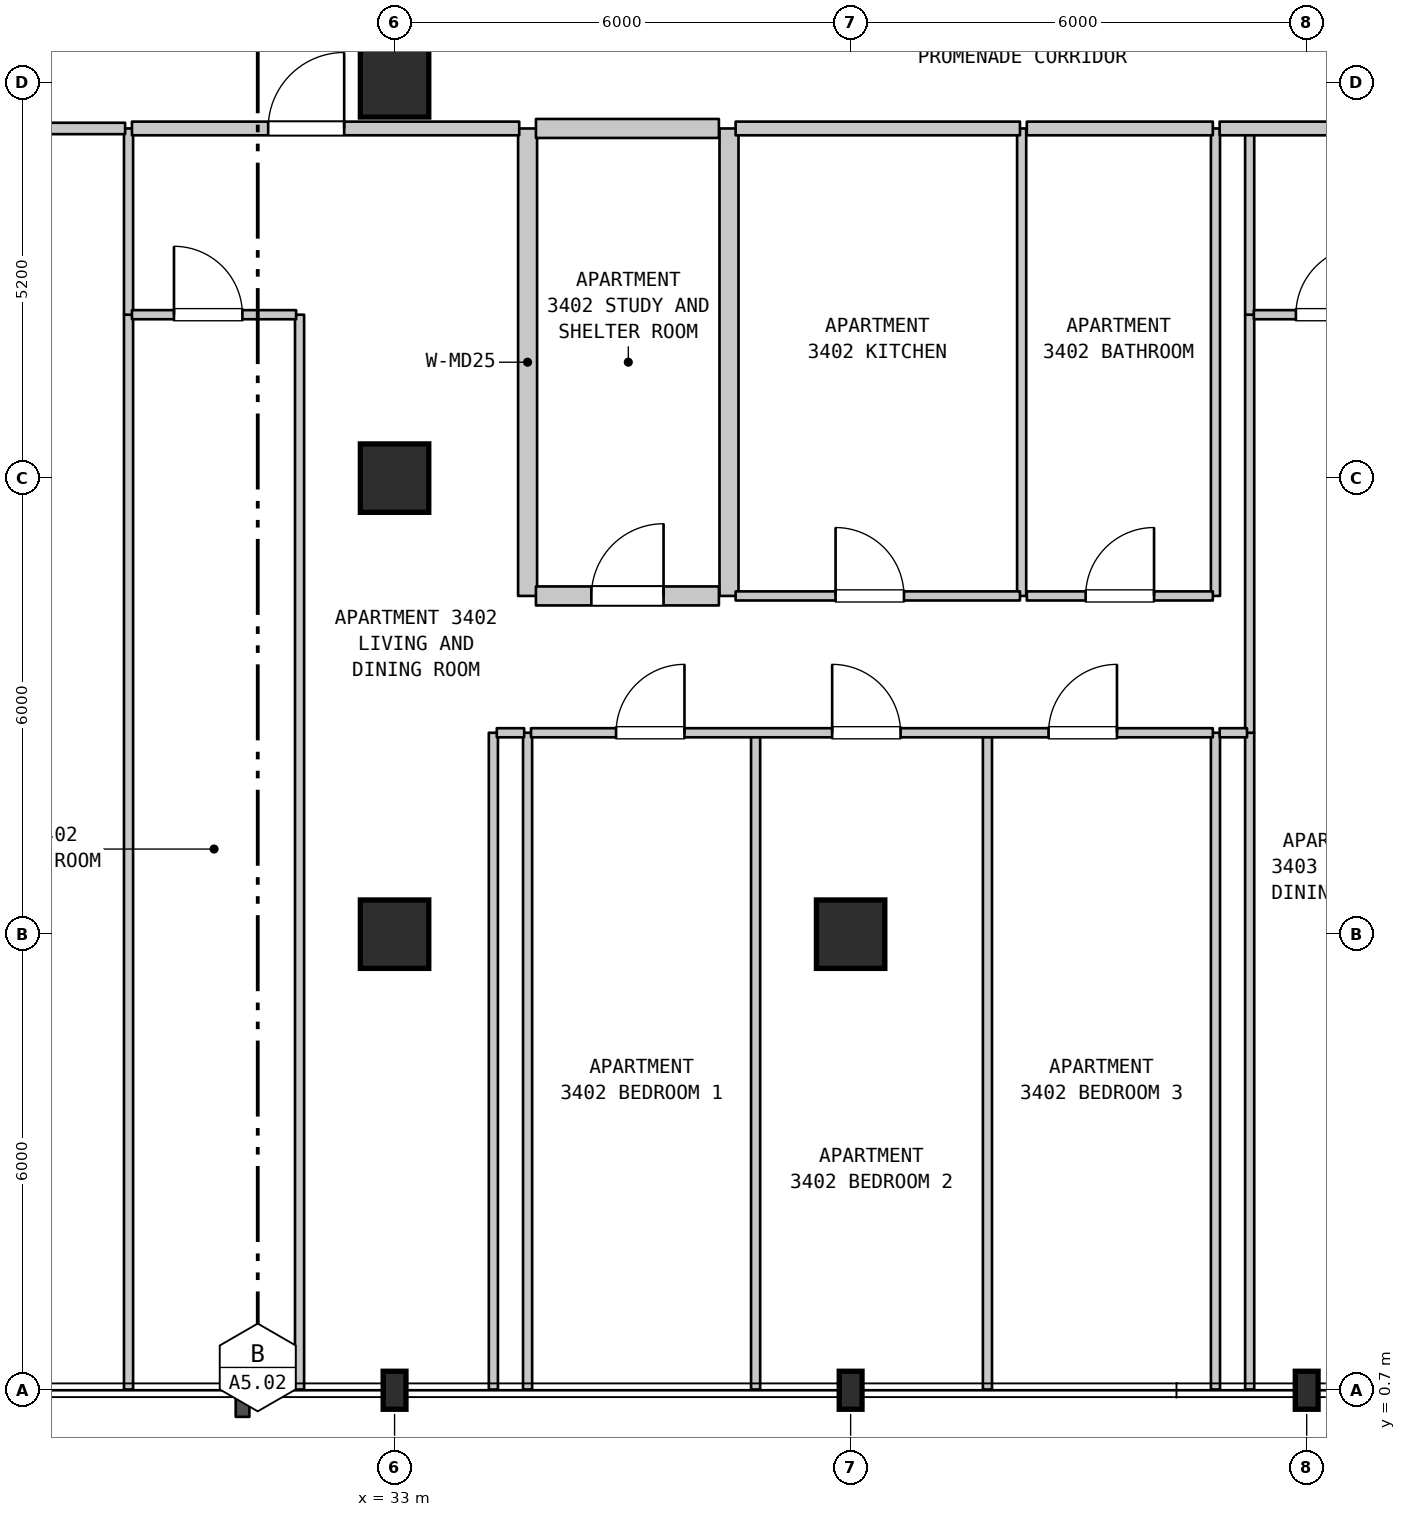
"""IFC4 building model, lengths in metres.
Left out: names, types, materials, properties, quantities, classifications, styles, units other than length and angle.
Written with IfcOpenShell. Run it as: python <this file> out.ifc"""

import sys

from ifc_helpers import new_model, si_unit, direction, frame, frame_2d, origin, origin_2d, place, context, subcontext, project, spatial, rectangle, i_section, extrude, element, fill, save


model = new_model("IFC4")
c1 = context("Model", 3, precision=1e-05, world=origin(), true_north=direction((0.0, 1.0)))
c2 = subcontext(c1, "Body", "Model", "MODEL_VIEW")
j1 = project(units=[si_unit("LENGTHUNIT", "METRE"), si_unit("PLANEANGLEUNIT", "RADIAN")], contexts=[c1])
p1 = place(None, origin())
s1 = spatial("IfcSite", under=j1, at=p1, CompositionType="ELEMENT")
p2 = place(p1, origin())
s2 = spatial("IfcBuilding", under=s1, at=p2, CompositionType="ELEMENT")
p3 = place(p2, frame((0.0, 0.0, 140.9)))
s3 = spatial("IfcBuildingStorey", under=s2, at=p3, CompositionType="ELEMENT", Elevation=140.9)
p4 = place(p3, frame((33.0, 0.7, 0.0), z_axis=(0.0, 0.0, 1.0), x_axis=(1.0, 0.0, 0.0)))
e1 = element("IfcColumn", 1, at=p4, inside=s3, PredefinedType="COLUMN", context=c2, shape_type="SweptSolid", body=[
    extrude(i_section(OverallWidth=0.3, OverallDepth=0.5, WebThickness=0.014, FlangeThickness=0.028, FilletRadius=0.027, at=origin_2d()), origin(), (0.0, 0.0, 1.0), 3.7),
])
for number, where, z_axis, x_axis in (
    (2, (33.0, 6.7, 0.0), (0.0, 0.0, 1.0), (1.0, 0.0, 0.0)),
    (3, (33.0, 12.7, 0.0), (0.0, 0.0, 1.0), (1.0, 0.0, 0.0)),
    (4, (33.0, 17.9, 0.0), (0.0, 0.0, 1.0), (1.0, 0.0, 0.0)),
):
    element("IfcColumn", number, at=place(p3, frame(where, z_axis=z_axis, x_axis=x_axis)), inside=s3, PredefinedType="COLUMN", context=c2, shape_type="SweptSolid", body=[
        extrude(rectangle(XDim=0.9, YDim=0.9, at=origin_2d()), origin(), (0.0, 0.0, 1.0), 3.7),
    ])
p5 = place(p3, frame((39.0, 0.7, 0.0), z_axis=(0.0, 0.0, 1.0), x_axis=(1.0, 0.0, 0.0)))
e5 = element("IfcColumn", 5, at=p5, inside=s3, PredefinedType="COLUMN", context=c2, shape_type="SweptSolid", body=[
    extrude(i_section(OverallWidth=0.3, OverallDepth=0.5, WebThickness=0.014, FlangeThickness=0.028, FilletRadius=0.027, at=origin_2d()), origin(), (0.0, 0.0, 1.0), 3.7),
])
p6 = place(p3, frame((39.0, 6.7, 0.0), z_axis=(0.0, 0.0, 1.0), x_axis=(1.0, 0.0, 0.0)))
e6 = element("IfcColumn", 6, at=p6, inside=s3, PredefinedType="COLUMN", context=c2, shape_type="SweptSolid", body=[
    extrude(rectangle(XDim=0.9, YDim=0.9, at=origin_2d()), origin(), (0.0, 0.0, 1.0), 3.7),
])
p7 = place(p3, frame((45.0, 0.7, 0.0), z_axis=(0.0, 0.0, 1.0), x_axis=(1.0, 0.0, 0.0)))
e7 = element("IfcColumn", 7, at=p7, inside=s3, PredefinedType="COLUMN", context=c2, shape_type="SweptSolid", body=[
    extrude(i_section(OverallWidth=0.3, OverallDepth=0.5, WebThickness=0.014, FlangeThickness=0.028, FilletRadius=0.027, at=origin_2d()), origin(), (0.0, 0.0, 1.0), 3.7),
])
p8 = place(p3, frame((29.5, 0.71, 0.0), z_axis=(0.0, 0.0, 1.0), x_axis=(0.0, 1.0, 0.0)))
e8 = element("IfcWall", 8, at=p8, inside=s3, PredefinedType="PARTITIONING", context=c2, shape_type="SweptSolid", body=[
    extrude(rectangle(XDim=14.14, YDim=0.12, at=frame_2d((7.07, 0.0))), origin(), (0.0, 0.0, 1.0), 3.385),
])
p9 = place(p3, frame((29.5, 14.85, 0.0), z_axis=(0.0, 0.0, 1.0), x_axis=(0.0, 1.0, 0.0)))
e9 = element("IfcWall", 9, at=p9, inside=s3, PredefinedType="PARTITIONING", context=c2, shape_type="SweptSolid", body=[
    extrude(rectangle(XDim=2.45, YDim=0.12, at=frame_2d((1.225, 0.0))), origin(), (0.0, 0.0, 1.0), 3.385),
])
p10 = place(p3, frame((31.75, 0.71, 0.0), z_axis=(0.0, 0.0, 1.0), x_axis=(0.0, 1.0, 0.0)))
e10 = element("IfcWall", 10, at=p10, inside=s3, PredefinedType="PARTITIONING", context=c2, shape_type="SweptSolid", body=[
    extrude(rectangle(XDim=14.14, YDim=0.12, at=frame_2d((7.07, 0.0))), origin(), (0.0, 0.0, 1.0), 3.385),
])
for number, where, z_axis, x_axis in (
    (11, (34.3, 0.71, 0.0), (0.0, 0.0, 1.0), (0.0, 1.0, 0.0)),
    (12, (34.75, 0.71, 0.0), (0.0, 0.0, 1.0), (0.0, 1.0, 0.0)),
):
    element("IfcWall", number, at=place(p3, frame(where, z_axis=z_axis, x_axis=x_axis)), inside=s3, PredefinedType="PARTITIONING", context=c2, shape_type="SweptSolid", body=[
        extrude(rectangle(XDim=8.64, YDim=0.12, at=frame_2d((4.32, 0.0))), origin(), (0.0, 0.0, 1.0), 3.385),
    ])
for number, where, z_axis, x_axis in (
    (13, (34.75, 11.15, 0.0), (0.0, 0.0, 1.0), (0.0, 1.0, 0.0)),
    (14, (37.4, 11.15, 0.0), (0.0, 0.0, 1.0), (0.0, 1.0, 0.0)),
):
    element("IfcWall", number, at=place(p3, frame(where, z_axis=z_axis, x_axis=x_axis)), inside=s3, PredefinedType="STANDARD", context=c2, shape_type="SweptSolid", body=[
        extrude(rectangle(XDim=6.15, YDim=0.25, at=frame_2d((3.075, 0.0))), origin(), (0.0, 0.0, 1.0), 3.385),
    ])
for number, where, z_axis, x_axis in (
    (15, (37.75, 0.71, 0.0), (0.0, 0.0, 1.0), (0.0, 1.0, 0.0)),
    (16, (40.8, 0.71, 0.0), (0.0, 0.0, 1.0), (0.0, 1.0, 0.0)),
):
    element("IfcWall", number, at=place(p3, frame(where, z_axis=z_axis, x_axis=x_axis)), inside=s3, PredefinedType="PARTITIONING", context=c2, shape_type="SweptSolid", body=[
        extrude(rectangle(XDim=8.64, YDim=0.12, at=frame_2d((4.32, 0.0))), origin(), (0.0, 0.0, 1.0), 3.385),
    ])
p11 = place(p3, frame((41.25, 11.15, 0.0), z_axis=(0.0, 0.0, 1.0), x_axis=(0.0, 1.0, 0.0)))
e17 = element("IfcWall", 17, at=p11, inside=s3, PredefinedType="PARTITIONING", context=c2, shape_type="SweptSolid", body=[
    extrude(rectangle(XDim=6.15, YDim=0.12, at=frame_2d((3.075, 0.0))), origin(), (0.0, 0.0, 1.0), 3.385),
])
p12 = place(p3, frame((43.8, 0.71, 0.0), z_axis=(0.0, 0.0, 1.0), x_axis=(0.0, 1.0, 0.0)))
e18 = element("IfcWall", 18, at=p12, inside=s3, PredefinedType="PARTITIONING", context=c2, shape_type="SweptSolid", body=[
    extrude(rectangle(XDim=8.64, YDim=0.12, at=frame_2d((4.32, 0.0))), origin(), (0.0, 0.0, 1.0), 3.385),
])
p13 = place(p3, frame((43.8, 11.15, 0.0), z_axis=(0.0, 0.0, 1.0), x_axis=(0.0, 1.0, 0.0)))
e19 = element("IfcWall", 19, at=p13, inside=s3, PredefinedType="PARTITIONING", context=c2, shape_type="SweptSolid", body=[
    extrude(rectangle(XDim=6.15, YDim=0.12, at=frame_2d((3.075, 0.0))), origin(), (0.0, 0.0, 1.0), 3.385),
])
p14 = place(p3, frame((44.25, 0.71, 0.0), z_axis=(0.0, 0.0, 1.0), x_axis=(0.0, 1.0, 0.0)))
e20 = element("IfcWall", 20, at=p14, inside=s3, PredefinedType="PARTITIONING", context=c2, shape_type="SweptSolid", body=[
    extrude(rectangle(XDim=8.64, YDim=0.12, at=frame_2d((4.32, 0.0))), origin(), (0.0, 0.0, 1.0), 3.385),
])
p15 = place(p3, frame((44.25, 9.35, 0.0), z_axis=(0.0, 0.0, 1.0), x_axis=(0.0, 1.0, 0.0)))
e21 = element("IfcWall", 21, at=p15, inside=s3, PredefinedType="PARTITIONING", context=c2, shape_type="SweptSolid", body=[
    extrude(rectangle(XDim=5.5, YDim=0.12, at=frame_2d((2.75, 0.0))), origin(), (0.0, 0.0, 1.0), 3.385),
])
p16 = place(p3, frame((44.25, 14.85, 0.0), z_axis=(0.0, 0.0, 1.0), x_axis=(0.0, 1.0, 0.0)))
e22 = element("IfcWall", 22, at=p16, inside=s3, PredefinedType="PARTITIONING", context=c2, shape_type="SweptSolid", body=[
    extrude(rectangle(XDim=2.45, YDim=0.12, at=frame_2d((1.225, 0.0))), origin(), (0.0, 0.0, 1.0), 3.385),
])
p17 = place(p3, frame((34.345, 9.35, 0.0), z_axis=(0.0, 0.0, 1.0), x_axis=(1.0, 0.0, 0.0)))
e23 = element("IfcWall", 23, at=p17, inside=s3, PredefinedType="PARTITIONING", context=c2, shape_type="SweptSolid", body=[
    extrude(rectangle(XDim=0.36, YDim=0.12, at=frame_2d((0.18, 0.0))), origin(), (0.0, 0.0, 1.0), 3.385),
])
p18 = place(p3, frame((34.795, 9.35, 0.0), z_axis=(0.0, 0.0, 1.0), x_axis=(1.0, 0.0, 0.0)))
e24 = element("IfcWall", 24, at=p18, inside=s3, PredefinedType="PARTITIONING", context=c2, shape_type="SweptSolid", body=[
    extrude(rectangle(XDim=8.97, YDim=0.12, at=frame_2d((4.485, 0.0))), origin(), (0.0, 0.0, 1.0), 3.385),
])
p19 = place(p18, frame((1.119, 0.0, 0.0)))
e25 = element("IfcOpeningElement", 25, at=p19, cuts=e24, PredefinedType="OPENING", context=c2, shape_type="SweptSolid", body=[
    extrude(rectangle(XDim=0.9, YDim=2.15, at=frame_2d((0.45, 1.075))), frame((0.0, 0.07, 0.0), z_axis=(0.0, -1.0, 0.0), x_axis=(1.0, 0.0, 0.0)), (0.0, 0.0, 1.0), 0.14),
])
p20 = place(p18, frame((3.962, 0.0, 0.0)))
e26 = element("IfcOpeningElement", 26, at=p20, cuts=e24, PredefinedType="OPENING", context=c2, shape_type="SweptSolid", body=[
    extrude(rectangle(XDim=0.9, YDim=2.15, at=frame_2d((0.45, 1.075))), frame((0.0, 0.07, 0.0), z_axis=(0.0, -1.0, 0.0), x_axis=(1.0, 0.0, 0.0)), (0.0, 0.0, 1.0), 0.14),
])
p21 = place(p18, frame((6.809, 0.0, 0.0)))
e27 = element("IfcOpeningElement", 27, at=p21, cuts=e24, PredefinedType="OPENING", context=c2, shape_type="SweptSolid", body=[
    extrude(rectangle(XDim=0.9, YDim=2.15, at=frame_2d((0.45, 1.075))), frame((0.0, 0.07, 0.0), z_axis=(0.0, -1.0, 0.0), x_axis=(1.0, 0.0, 0.0)), (0.0, 0.0, 1.0), 0.14),
])
p22 = place(p3, frame((43.855, 9.35, 0.0), z_axis=(0.0, 0.0, 1.0), x_axis=(1.0, 0.0, 0.0)))
e28 = element("IfcWall", 28, at=p22, inside=s3, PredefinedType="PARTITIONING", context=c2, shape_type="SweptSolid", body=[
    extrude(rectangle(XDim=0.36, YDim=0.12, at=frame_2d((0.18, 0.0))), origin(), (0.0, 0.0, 1.0), 3.385),
])
p23 = place(p3, frame((34.86, 11.15, 0.0), z_axis=(0.0, 0.0, 1.0), x_axis=(1.0, 0.0, 0.0)))
e29 = element("IfcWall", 29, at=p23, inside=s3, PredefinedType="STANDARD", context=c2, shape_type="SweptSolid", body=[
    extrude(rectangle(XDim=2.407, YDim=0.25, at=frame_2d((1.204, 0.0))), origin(), (0.0, 0.0, 1.0), 3.385),
])
p24 = place(p23, frame((0.729, 0.0, 0.0)))
e30 = element("IfcOpeningElement", 30, at=p24, cuts=e29, PredefinedType="OPENING", context=c2, shape_type="SweptSolid", body=[
    extrude(rectangle(XDim=0.95, YDim=2.15, at=frame_2d((0.475, 1.075))), frame((0.0, 0.135, 0.0), z_axis=(0.0, -1.0, 0.0), x_axis=(1.0, 0.0, 0.0)), (0.0, 0.0, 1.0), 0.27),
])
p25 = place(p3, frame((37.487, 11.15, 0.0), z_axis=(0.0, 0.0, 1.0), x_axis=(1.0, 0.0, 0.0)))
e31 = element("IfcWall", 31, at=p25, inside=s3, PredefinedType="PARTITIONING", context=c2, shape_type="SweptSolid", body=[
    extrude(rectangle(XDim=3.741, YDim=0.12, at=frame_2d((1.871, 0.0))), origin(), (0.0, 0.0, 1.0), 3.385),
])
p26 = place(p25, frame((1.315, 0.0, 0.0)))
e32 = element("IfcOpeningElement", 32, at=p26, cuts=e31, PredefinedType="OPENING", context=c2, shape_type="SweptSolid", body=[
    extrude(rectangle(XDim=0.9, YDim=2.15, at=frame_2d((0.45, 1.075))), frame((0.0, 0.07, 0.0), z_axis=(0.0, -1.0, 0.0), x_axis=(1.0, 0.0, 0.0)), (0.0, 0.0, 1.0), 0.14),
])
p27 = place(p3, frame((41.318, 11.15, 0.0), z_axis=(0.0, 0.0, 1.0), x_axis=(1.0, 0.0, 0.0)))
e33 = element("IfcWall", 33, at=p27, inside=s3, PredefinedType="PARTITIONING", context=c2, shape_type="SweptSolid", body=[
    extrude(rectangle(XDim=2.447, YDim=0.12, at=frame_2d((1.223, 0.0))), origin(), (0.0, 0.0, 1.0), 3.385),
])
p28 = place(p27, frame((0.774, 0.0, 0.0)))
e34 = element("IfcOpeningElement", 34, at=p28, cuts=e33, PredefinedType="OPENING", context=c2, shape_type="SweptSolid", body=[
    extrude(rectangle(XDim=0.9, YDim=2.1, at=frame_2d((0.45, 1.05))), frame((0.0, 0.07, 0.0), z_axis=(0.0, -1.0, 0.0), x_axis=(1.0, 0.0, 0.0)), (0.0, 0.0, 1.0), 0.14),
])
p29 = place(p3, frame((29.545, 14.85, 0.0), z_axis=(0.0, 0.0, 1.0), x_axis=(1.0, 0.0, 0.0)))
e35 = element("IfcWall", 35, at=p29, inside=s3, PredefinedType="PARTITIONING", context=c2, shape_type="SweptSolid", body=[
    extrude(rectangle(XDim=2.16, YDim=0.12, at=frame_2d((1.08, 0.0))), origin(), (0.0, 0.0, 1.0), 3.385),
])
p30 = place(p29, frame((0.553, 0.0, 0.0)))
e36 = element("IfcOpeningElement", 36, at=p30, cuts=e35, PredefinedType="OPENING", context=c2, shape_type="SweptSolid", body=[
    extrude(rectangle(XDim=0.9, YDim=2.15, at=frame_2d((0.45, 1.075))), frame((0.0, 0.07, 0.0), z_axis=(0.0, -1.0, 0.0), x_axis=(1.0, 0.0, 0.0)), (0.0, 0.0, 1.0), 0.14),
])
p31 = place(p3, frame((44.305, 14.85, 0.0), z_axis=(0.0, 0.0, 1.0), x_axis=(1.0, 0.0, 0.0)))
e37 = element("IfcWall", 37, at=p31, inside=s3, PredefinedType="PARTITIONING", context=c2, shape_type="SweptSolid", body=[
    extrude(rectangle(XDim=2.16, YDim=0.12, at=frame_2d((1.08, 0.0))), origin(), (0.0, 0.0, 1.0), 3.385),
])
p32 = place(p31, frame((0.553, 0.0, 0.0)))
e38 = element("IfcOpeningElement", 38, at=p32, cuts=e37, PredefinedType="OPENING", context=c2, shape_type="SweptSolid", body=[
    extrude(rectangle(XDim=0.9, YDim=2.15, at=frame_2d((0.45, 1.075))), frame((0.0, 0.07, 0.0), z_axis=(0.0, -1.0, 0.0), x_axis=(1.0, 0.0, 0.0)), (0.0, 0.0, 1.0), 0.14),
])
p33 = place(p3, frame((24.845, 17.3, 0.0), z_axis=(0.0, 0.0, 1.0), x_axis=(1.0, 0.0, 0.0)))
e39 = element("IfcWall", 39, at=p33, inside=s3, PredefinedType="STANDARD", context=c2, shape_type="SweptSolid", body=[
    extrude(rectangle(XDim=4.61, YDim=0.15, at=frame_2d((2.305, 0.0))), origin(), (0.0, 0.0, 1.0), 3.385),
])
p34 = place(p33, frame((1.734, 0.0, 0.0)))
e40 = element("IfcOpeningElement", 40, at=p34, cuts=e39, PredefinedType="OPENING", context=c2, shape_type="SweptSolid", body=[
    extrude(rectangle(XDim=1.0, YDim=2.15, at=frame_2d((0.5, 1.075))), frame((0.0, 0.085, 0.0), z_axis=(0.0, -1.0, 0.0), x_axis=(1.0, 0.0, 0.0)), (0.0, 0.0, 1.0), 0.17),
])
p35 = place(p3, frame((29.545, 17.3, 0.0), z_axis=(0.0, 0.0, 1.0), x_axis=(1.0, 0.0, 0.0)))
e41 = element("IfcWall", 41, at=p35, inside=s3, PredefinedType="STANDARD", context=c2, shape_type="SweptSolid", body=[
    extrude(rectangle(XDim=5.095, YDim=0.18, at=frame_2d((2.547, 0.0))), origin(), (0.0, 0.0, 1.0), 3.385),
])
p36 = place(p35, frame((1.792, 0.0, 0.0)))
e42 = element("IfcOpeningElement", 42, at=p36, cuts=e41, PredefinedType="OPENING", context=c2, shape_type="SweptSolid", body=[
    extrude(rectangle(XDim=1.0, YDim=2.15, at=frame_2d((0.5, 1.075))), frame((0.0, 0.1, 0.0), z_axis=(0.0, -1.0, 0.0), x_axis=(1.0, 0.0, 0.0)), (0.0, 0.0, 1.0), 0.2),
])
p37 = place(p3, frame((34.86, 17.3, 0.0), z_axis=(0.0, 0.0, 1.0), x_axis=(1.0, 0.0, 0.0)))
e43 = element("IfcWall", 43, at=p37, inside=s3, PredefinedType="STANDARD", context=c2, shape_type="SweptSolid", body=[
    extrude(rectangle(XDim=2.407, YDim=0.25, at=frame_2d((1.204, 0.0))), origin(), (0.0, 0.0, 1.0), 3.385),
])
p38 = place(p3, frame((37.487, 17.3, 0.0), z_axis=(0.0, 0.0, 1.0), x_axis=(1.0, 0.0, 0.0)))
e44 = element("IfcWall", 44, at=p38, inside=s3, PredefinedType="STANDARD", context=c2, shape_type="SweptSolid", body=[
    extrude(rectangle(XDim=3.741, YDim=0.18, at=frame_2d((1.871, 0.0))), origin(), (0.0, 0.0, 1.0), 3.385),
])
p39 = place(p3, frame((41.318, 17.3, 0.0), z_axis=(0.0, 0.0, 1.0), x_axis=(1.0, 0.0, 0.0)))
e45 = element("IfcWall", 45, at=p39, inside=s3, PredefinedType="STANDARD", context=c2, shape_type="SweptSolid", body=[
    extrude(rectangle(XDim=2.447, YDim=0.18, at=frame_2d((1.223, 0.0))), origin(), (0.0, 0.0, 1.0), 3.385),
])
p40 = place(p3, frame((43.855, 17.3, 0.0), z_axis=(0.0, 0.0, 1.0), x_axis=(1.0, 0.0, 0.0)))
e46 = element("IfcWall", 46, at=p40, inside=s3, PredefinedType="STANDARD", context=c2, shape_type="SweptSolid", body=[
    extrude(rectangle(XDim=5.21, YDim=0.18, at=frame_2d((2.605, 0.0))), origin(), (0.0, 0.0, 1.0), 3.385),
])
p41 = place(p40, frame((2.305, 0.0, 0.0)))
e47 = element("IfcOpeningElement", 47, at=p41, cuts=e46, PredefinedType="OPENING", context=c2, shape_type="SweptSolid", body=[
    extrude(rectangle(XDim=1.0, YDim=2.15, at=frame_2d((0.5, 1.075))), frame((0.0, 0.1, 0.0), z_axis=(0.0, -1.0, 0.0), x_axis=(1.0, 0.0, 0.0)), (0.0, 0.0, 1.0), 0.2),
])
p42 = place(p19, origin())
e48 = element("IfcDoor", 48, at=p42, inside=s3, OperationType="SINGLE_SWING_RIGHT", PredefinedType="DOOR", context=c2, shape_type="SweptSolid", body=[
    extrude(rectangle(XDim=0.9, YDim=2.15, at=frame_2d((0.45, 1.075))), frame((0.0, 0.025, 0.0), z_axis=(0.0, -1.0, 0.0), x_axis=(1.0, 0.0, 0.0)), (0.0, 0.0, 1.0), 0.05),
])
fill(e25, e48)
p43 = place(p20, origin())
e49 = element("IfcDoor", 49, at=p43, inside=s3, OperationType="SINGLE_SWING_LEFT", PredefinedType="DOOR", context=c2, shape_type="SweptSolid", body=[
    extrude(rectangle(XDim=0.9, YDim=2.15, at=frame_2d((0.45, 1.075))), frame((0.0, 0.025, 0.0), z_axis=(0.0, -1.0, 0.0), x_axis=(1.0, 0.0, 0.0)), (0.0, 0.0, 1.0), 0.05),
])
fill(e26, e49)
p44 = place(p21, origin())
e50 = element("IfcDoor", 50, at=p44, inside=s3, OperationType="SINGLE_SWING_RIGHT", PredefinedType="DOOR", context=c2, shape_type="SweptSolid", body=[
    extrude(rectangle(XDim=0.9, YDim=2.15, at=frame_2d((0.45, 1.075))), frame((0.0, 0.025, 0.0), z_axis=(0.0, -1.0, 0.0), x_axis=(1.0, 0.0, 0.0)), (0.0, 0.0, 1.0), 0.05),
])
fill(e27, e50)
p45 = place(p24, origin())
e51 = element("IfcDoor", 51, at=p45, inside=s3, OperationType="SINGLE_SWING_RIGHT", PredefinedType="DOOR", context=c2, shape_type="SweptSolid", body=[
    extrude(rectangle(XDim=0.95, YDim=2.15, at=frame_2d((0.475, 1.075))), frame((0.0, 0.025, 0.0), z_axis=(0.0, -1.0, 0.0), x_axis=(1.0, 0.0, 0.0)), (0.0, 0.0, 1.0), 0.05),
])
fill(e30, e51)
p46 = place(p26, origin())
e52 = element("IfcDoor", 52, at=p46, inside=s3, OperationType="SINGLE_SWING_LEFT", PredefinedType="DOOR", context=c2, shape_type="SweptSolid", body=[
    extrude(rectangle(XDim=0.9, YDim=2.15, at=frame_2d((0.45, 1.075))), frame((0.0, 0.025, 0.0), z_axis=(0.0, -1.0, 0.0), x_axis=(1.0, 0.0, 0.0)), (0.0, 0.0, 1.0), 0.05),
])
fill(e32, e52)
p47 = place(p28, origin())
e53 = element("IfcDoor", 53, at=p47, inside=s3, OperationType="SINGLE_SWING_RIGHT", PredefinedType="DOOR", context=c2, shape_type="SweptSolid", body=[
    extrude(rectangle(XDim=0.9, YDim=2.1, at=frame_2d((0.45, 1.05))), frame((0.0, 0.025, 0.0), z_axis=(0.0, -1.0, 0.0), x_axis=(1.0, 0.0, 0.0)), (0.0, 0.0, 1.0), 0.05),
])
fill(e34, e53)
p48 = place(p30, origin())
e54 = element("IfcDoor", 54, at=p48, inside=s3, OperationType="SINGLE_SWING_LEFT", PredefinedType="DOOR", context=c2, shape_type="SweptSolid", body=[
    extrude(rectangle(XDim=0.9, YDim=2.15, at=frame_2d((0.45, 1.075))), frame((0.0, 0.025, 0.0), z_axis=(0.0, -1.0, 0.0), x_axis=(1.0, 0.0, 0.0)), (0.0, 0.0, 1.0), 0.05),
])
fill(e36, e54)
p49 = place(p32, origin())
e55 = element("IfcDoor", 55, at=p49, inside=s3, OperationType="SINGLE_SWING_RIGHT", PredefinedType="DOOR", context=c2, shape_type="SweptSolid", body=[
    extrude(rectangle(XDim=0.9, YDim=2.15, at=frame_2d((0.45, 1.075))), frame((0.0, 0.025, 0.0), z_axis=(0.0, -1.0, 0.0), x_axis=(1.0, 0.0, 0.0)), (0.0, 0.0, 1.0), 0.05),
])
fill(e38, e55)
p50 = place(p36, origin())
e56 = element("IfcDoor", 56, at=p50, inside=s3, OperationType="SINGLE_SWING_RIGHT", PredefinedType="DOOR", context=c2, shape_type="SweptSolid", body=[
    extrude(rectangle(XDim=1.0, YDim=2.15, at=frame_2d((0.5, 1.075))), frame((0.0, 0.025, 0.0), z_axis=(0.0, -1.0, 0.0), x_axis=(1.0, 0.0, 0.0)), (0.0, 0.0, 1.0), 0.05),
])
fill(e42, e56)
save(model, sys.argv[1])
